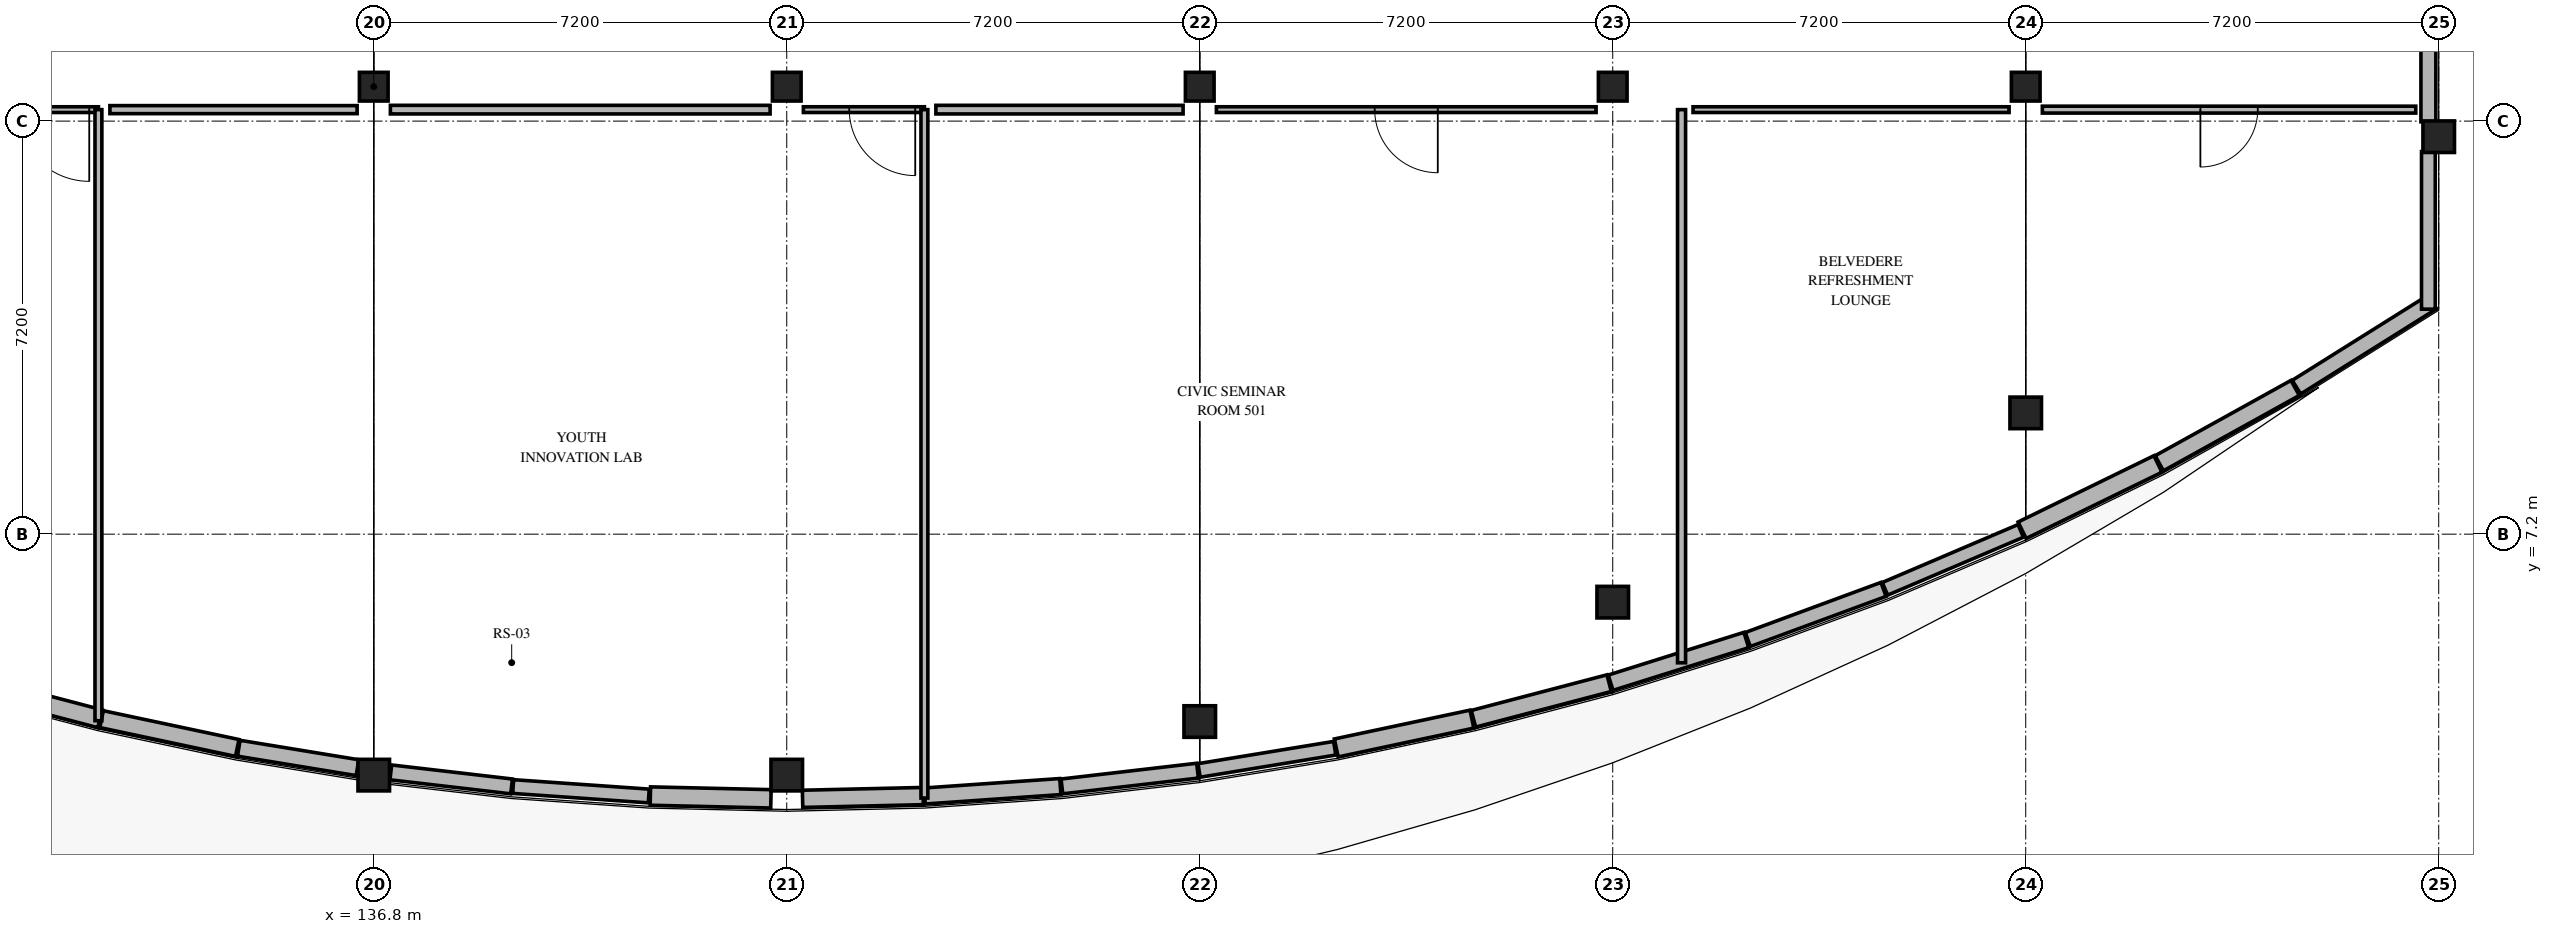
"""IFC4 building model, lengths in metres.
Left out: names, types, materials, properties, quantities, classifications, styles, units other than length and angle.
Written with IfcOpenShell. Run it as: python <this file> out.ifc"""

import sys

from ifc_helpers import new_model, si_unit, direction, frame, frame_2d, origin, origin_2d, place, context, subcontext, project, spatial, rectangle, extrude, element, fill, save


model = new_model("IFC4")
c1 = context("Model", 3, precision=1e-05, world=origin(), true_north=direction((0.0, 1.0)))
c2 = subcontext(c1, "Body", "Model", "MODEL_VIEW")
j1 = project(units=[si_unit("LENGTHUNIT", "METRE"), si_unit("PLANEANGLEUNIT", "RADIAN")], contexts=[c1])
p1 = place(None, origin())
s1 = spatial("IfcSite", under=j1, at=p1, CompositionType="ELEMENT")
p2 = place(p1, origin())
s2 = spatial("IfcBuilding", under=s1, at=p2, CompositionType="ELEMENT")
p3 = place(p2, frame((0.0, 0.0, 20.7)))
s3 = spatial("IfcBuildingStorey", under=s2, at=p3, CompositionType="ELEMENT", Elevation=20.7)
p4 = place(p3, frame((136.8, 3.0, 0.0), z_axis=(0.0, 0.0, 1.0), x_axis=(1.0, 0.0, 0.0)))
e1 = element("IfcColumn", 1, at=p4, inside=s3, PredefinedType="COLUMN", context=c2, shape_type="SweptSolid", body=[
    extrude(rectangle(XDim=0.55, YDim=0.55, at=origin_2d()), origin(), (0.0, 0.0, 1.0), 3.9),
])
p5 = place(p3, frame((136.8, 15.0, 0.0), z_axis=(0.0, 0.0, 1.0), x_axis=(1.0, 0.0, 0.0)))
e2 = element("IfcColumn", 2, at=p5, inside=s3, PredefinedType="COLUMN", context=c2, shape_type="SweptSolid", body=[
    extrude(rectangle(XDim=0.5, YDim=0.5, at=origin_2d()), origin(), (0.0, 0.0, 1.0), 3.9),
])
p6 = place(p3, frame((144.0, 3.0, 0.0), z_axis=(0.0, 0.0, 1.0), x_axis=(1.0, 0.0, 0.0)))
e3 = element("IfcColumn", 3, at=p6, inside=s3, PredefinedType="COLUMN", context=c2, shape_type="SweptSolid", body=[
    extrude(rectangle(XDim=0.55, YDim=0.55, at=origin_2d()), origin(), (0.0, 0.0, 1.0), 3.9),
])
p7 = place(p3, frame((144.0, 15.0, 0.0), z_axis=(0.0, 0.0, 1.0), x_axis=(1.0, 0.0, 0.0)))
e4 = element("IfcColumn", 4, at=p7, inside=s3, PredefinedType="COLUMN", context=c2, shape_type="SweptSolid", body=[
    extrude(rectangle(XDim=0.5, YDim=0.5, at=origin_2d()), origin(), (0.0, 0.0, 1.0), 3.9),
])
p8 = place(p3, frame((151.2, 3.934, 0.0), z_axis=(0.0, 0.0, 1.0), x_axis=(1.0, 0.0, 0.0)))
e5 = element("IfcColumn", 5, at=p8, inside=s3, PredefinedType="COLUMN", context=c2, shape_type="SweptSolid", body=[
    extrude(rectangle(XDim=0.55, YDim=0.55, at=origin_2d()), origin(), (0.0, 0.0, 1.0), 3.9),
])
p9 = place(p3, frame((151.2, 15.0, 0.0), z_axis=(0.0, 0.0, 1.0), x_axis=(1.0, 0.0, 0.0)))
e6 = element("IfcColumn", 6, at=p9, inside=s3, PredefinedType="COLUMN", context=c2, shape_type="SweptSolid", body=[
    extrude(rectangle(XDim=0.5, YDim=0.5, at=origin_2d()), origin(), (0.0, 0.0, 1.0), 3.9),
])
p10 = place(p3, frame((158.4, 6.015, 0.0), z_axis=(0.0, 0.0, 1.0), x_axis=(1.0, 0.0, 0.0)))
e7 = element("IfcColumn", 7, at=p10, inside=s3, PredefinedType="COLUMN", context=c2, shape_type="SweptSolid", body=[
    extrude(rectangle(XDim=0.55, YDim=0.55, at=origin_2d()), origin(), (0.0, 0.0, 1.0), 3.9),
])
p11 = place(p3, frame((158.4, 15.0, 0.0), z_axis=(0.0, 0.0, 1.0), x_axis=(1.0, 0.0, 0.0)))
e8 = element("IfcColumn", 8, at=p11, inside=s3, PredefinedType="COLUMN", context=c2, shape_type="SweptSolid", body=[
    extrude(rectangle(XDim=0.5, YDim=0.5, at=origin_2d()), origin(), (0.0, 0.0, 1.0), 3.9),
])
p12 = place(p3, frame((165.6, 9.314, 0.0), z_axis=(0.0, 0.0, 1.0), x_axis=(1.0, 0.0, 0.0)))
e9 = element("IfcColumn", 9, at=p12, inside=s3, PredefinedType="COLUMN", context=c2, shape_type="SweptSolid", body=[
    extrude(rectangle(XDim=0.55, YDim=0.55, at=origin_2d()), origin(), (0.0, 0.0, 1.0), 3.9),
])
p13 = place(p3, frame((165.6, 15.0, 0.0), z_axis=(0.0, 0.0, 1.0), x_axis=(1.0, 0.0, 0.0)))
e10 = element("IfcColumn", 10, at=p13, inside=s3, PredefinedType="COLUMN", context=c2, shape_type="SweptSolid", body=[
    extrude(rectangle(XDim=0.5, YDim=0.5, at=origin_2d()), origin(), (0.0, 0.0, 1.0), 3.9),
])
p14 = place(p3, frame((172.8, 14.128, 0.0), z_axis=(0.0, 0.0, 1.0), x_axis=(1.0, 0.0, 0.0)))
e11 = element("IfcColumn", 11, at=p14, inside=s3, PredefinedType="COLUMN", context=c2, shape_type="SweptSolid", body=[
    extrude(rectangle(XDim=0.55, YDim=0.55, at=origin_2d()), origin(), (0.0, 0.0, 1.0), 3.9),
])
p15 = place(p3, frame((132.028, 3.982, 0.0), z_axis=(0.0, 0.0, 1.0), x_axis=(-0.967257930518, 0.253795381852, 0.0)))
e12 = element("IfcWall", 12, at=p15, inside=s3, PredefinedType="SOLIDWALL", context=c2, shape_type="SweptSolid", body=[
    extrude(rectangle(XDim=2.445, YDim=0.32, at=frame_2d((1.223, 0.0))), origin(), (0.0, 0.0, 1.0), 3.01),
])
p16 = place(p3, frame((134.42, 3.474, 0.0), z_axis=(0.0, 0.0, 1.0), x_axis=(-0.978189380311, 0.207715036162, 0.0)))
e13 = element("IfcWall", 13, at=p16, inside=s3, PredefinedType="SOLIDWALL", context=c2, shape_type="SweptSolid", body=[
    extrude(rectangle(XDim=2.418, YDim=0.3, at=frame_2d((1.209, 0.0))), origin(), (0.0, 0.0, 1.0), 3.06),
])
p17 = place(p3, frame((136.516, 3.13, 0.0), z_axis=(0.0, 0.0, 1.0), x_axis=(-0.986855683542, 0.161604021798, 0.0)))
e14 = element("IfcWall", 14, at=p17, inside=s3, PredefinedType="SOLIDWALL", context=c2, shape_type="SweptSolid", body=[
    extrude(rectangle(XDim=2.097, YDim=0.28, at=frame_2d((1.048, 0.0))), origin(), (0.0, 0.0, 1.0), 3.06),
])
p18 = place(p3, frame((139.203, 2.803, 0.0), z_axis=(0.0, 0.0, 1.0), x_axis=(-0.993317824854, 0.115410999595, 0.0)))
e15 = element("IfcWall", 15, at=p18, inside=s3, PredefinedType="SOLIDWALL", context=c2, shape_type="SweptSolid", body=[
    extrude(rectangle(XDim=2.12, YDim=0.26, at=frame_2d((1.06, 0.0))), origin(), (0.0, 0.0, 1.0), 3.06),
])
p19 = place(p3, frame((141.594, 2.636, 0.0), z_axis=(0.0, 0.0, 1.0), x_axis=(-0.997600485651, 0.069233453099, 0.0)))
e16 = element("IfcWall", 16, at=p19, inside=s3, PredefinedType="SOLIDWALL", context=c2, shape_type="SweptSolid", body=[
    extrude(rectangle(XDim=2.37, YDim=0.24, at=frame_2d((1.185, 0.0))), origin(), (0.0, 0.0, 1.0), 3.06),
])
p20 = place(p3, frame((143.724, 2.586, 0.0), z_axis=(0.0, 0.0, 1.0), x_axis=(-0.99973294744, 0.023109171395, 0.0)))
e17 = element("IfcWall", 17, at=p20, inside=s3, PredefinedType="SOLIDWALL", context=c2, shape_type="SweptSolid", body=[
    extrude(rectangle(XDim=2.102, YDim=0.32, at=frame_2d((1.051, 0.0))), origin(), (0.0, 0.0, 1.0), 3.66),
])
p21 = place(p3, frame((146.378, 2.635, 0.0), z_axis=(0.0, 0.0, 1.0), x_axis=(-0.99973294744, -0.023109171395, 0.0)))
e18 = element("IfcWall", 18, at=p21, inside=s3, PredefinedType="SOLIDWALL", context=c2, shape_type="SweptSolid", body=[
    extrude(rectangle(XDim=2.102, YDim=0.3, at=frame_2d((1.051, 0.0))), origin(), (0.0, 0.0, 1.0), 3.06),
])
p22 = place(p3, frame((148.77, 2.8, 0.0), z_axis=(0.0, 0.0, 1.0), x_axis=(-0.997600485651, -0.069233453099, 0.0)))
e19 = element("IfcWall", 19, at=p22, inside=s3, PredefinedType="SOLIDWALL", context=c2, shape_type="SweptSolid", body=[
    extrude(rectangle(XDim=2.37, YDim=0.28, at=frame_2d((1.185, 0.0))), origin(), (0.0, 0.0, 1.0), 3.06),
])
p23 = place(p3, frame((151.161, 3.078, 0.0), z_axis=(0.0, 0.0, 1.0), x_axis=(-0.993319690017, -0.115394945402, 0.0)))
e20 = element("IfcWall", 20, at=p23, inside=s3, PredefinedType="SOLIDWALL", context=c2, shape_type="SweptSolid", body=[
    extrude(rectangle(XDim=2.38, YDim=0.26, at=frame_2d((1.19, 0.0))), origin(), (0.0, 0.0, 1.0), 3.06),
])
p24 = place(p3, frame((153.553, 3.469, 0.0), z_axis=(0.0, 0.0, 1.0), x_axis=(-0.986852722913, -0.161622100221, 0.0)))
e21 = element("IfcWall", 21, at=p24, inside=s3, PredefinedType="SOLIDWALL", context=c2, shape_type="SweptSolid", body=[
    extrude(rectangle(XDim=2.396, YDim=0.24, at=frame_2d((1.198, 0.0))), origin(), (0.0, 0.0, 1.0), 3.06),
])
p25 = place(p3, frame((155.945, 3.976, 0.0), z_axis=(0.0, 0.0, 1.0), x_axis=(-0.978189380311, -0.207715036162, 0.0)))
e22 = element("IfcWall", 22, at=p25, inside=s3, PredefinedType="SOLIDWALL", context=c2, shape_type="SweptSolid", body=[
    extrude(rectangle(XDim=2.418, YDim=0.32, at=frame_2d((1.209, 0.0))), origin(), (0.0, 0.0, 1.0), 3.06),
])
p26 = place(p3, frame((158.337, 4.603, 0.0), z_axis=(0.0, 0.0, 1.0), x_axis=(-0.967257930518, -0.253795381852, 0.0)))
e23 = element("IfcWall", 23, at=p26, inside=s3, PredefinedType="SOLIDWALL", context=c2, shape_type="SweptSolid", body=[
    extrude(rectangle(XDim=2.445, YDim=0.3, at=frame_2d((1.223, 0.0))), origin(), (0.0, 0.0, 1.0), 3.06),
])
p27 = place(p3, frame((160.729, 5.355, 0.0), z_axis=(0.0, 0.0, 1.0), x_axis=(-0.953884231724, -0.30017473656, 0.0)))
e24 = element("IfcWall", 24, at=p27, inside=s3, PredefinedType="SOLIDWALL", context=c2, shape_type="SweptSolid", body=[
    extrude(rectangle(XDim=2.48, YDim=0.28, at=frame_2d((1.24, 0.0))), origin(), (0.0, 0.0, 1.0), 3.06),
])
p28 = place(p3, frame((163.121, 6.237, 0.0), z_axis=(0.0, 0.0, 1.0), x_axis=(-0.938146303957, -0.346239097117, 0.0)))
e25 = element("IfcWall", 25, at=p28, inside=s3, PredefinedType="SOLIDWALL", context=c2, shape_type="SweptSolid", body=[
    extrude(rectangle(XDim=2.522, YDim=0.26, at=frame_2d((1.261, 0.0))), origin(), (0.0, 0.0, 1.0), 3.06),
])
p29 = place(p3, frame((165.513, 7.257, 0.0), z_axis=(0.0, 0.0, 1.0), x_axis=(-0.919781821174, -0.392430123001, 0.0)))
e26 = element("IfcWall", 26, at=p29, inside=s3, PredefinedType="SOLIDWALL", context=c2, shape_type="SweptSolid", body=[
    extrude(rectangle(XDim=2.573, YDim=0.24, at=frame_2d((1.287, 0.0))), origin(), (0.0, 0.0, 1.0), 3.06),
])
p30 = place(p3, frame((167.905, 8.424, 0.0), z_axis=(0.0, 0.0, 1.0), x_axis=(-0.898667775588, -0.438629945535, 0.0)))
e27 = element("IfcWall", 27, at=p30, inside=s3, PredefinedType="SOLIDWALL", context=c2, shape_type="SweptSolid", body=[
    extrude(rectangle(XDim=2.634, YDim=0.32, at=frame_2d((1.317, 0.0))), origin(), (0.0, 0.0, 1.0), 3.06),
])
p31 = place(p3, frame((170.297, 9.749, 0.0), z_axis=(0.0, 0.0, 1.0), x_axis=(-0.874616129919, -0.484816073666, 0.0)))
e28 = element("IfcWall", 28, at=p31, inside=s3, PredefinedType="SOLIDWALL", context=c2, shape_type="SweptSolid", body=[
    extrude(rectangle(XDim=2.708, YDim=0.3, at=frame_2d((1.354, 0.0))), origin(), (0.0, 0.0, 1.0), 3.06),
])
p32 = place(p3, frame((172.689, 11.247, 0.0), z_axis=(0.0, 0.0, 1.0), x_axis=(-0.847458290903, -0.530861983174, 0.0)))
e29 = element("IfcWall", 29, at=p32, inside=s3, PredefinedType="SOLIDWALL", context=c2, shape_type="SweptSolid", body=[
    extrude(rectangle(XDim=2.796, YDim=0.28, at=frame_2d((1.398, 0.0))), origin(), (0.0, 0.0, 1.0), 3.06),
])
p33 = place(p3, frame((172.62, 22.165, 0.0), z_axis=(0.0, 0.0, 1.0), x_axis=(0.0, -1.0, 0.0)))
e30 = element("IfcWall", 30, at=p33, inside=s3, PredefinedType="SOLIDWALL", context=c2, shape_type="SweptSolid", body=[
    extrude(rectangle(XDim=7.777, YDim=0.26, at=frame_2d((3.889, 0.0))), origin(), (0.0, 0.0, 1.0), 2.9),
])
p34 = place(p33, frame((2.989, 0.0, 0.9)))
e31 = element("IfcOpeningElement", 31, at=p34, cuts=e30, PredefinedType="OPENING", context=c2, shape_type="SweptSolid", body=[
    extrude(rectangle(XDim=1.8, YDim=0.75, at=frame_2d((0.9, 0.375))), frame((0.0, 0.14, 0.0), z_axis=(0.0, -1.0, 0.0), x_axis=(1.0, 0.0, 0.0)), (0.0, 0.0, 1.0), 0.28),
])
p35 = place(p3, frame((172.62, 13.868, 0.0), z_axis=(0.0, 0.0, 1.0), x_axis=(0.0, -1.0, 0.0)))
e32 = element("IfcWall", 32, at=p35, inside=s3, PredefinedType="SOLIDWALL", context=c2, shape_type="SweptSolid", body=[
    extrude(rectangle(XDim=2.746, YDim=0.24, at=frame_2d((1.373, 0.0))), origin(), (0.0, 0.0, 1.0), 3.06),
])
p36 = place(p3, frame((132.0, 14.6, 0.0), z_axis=(0.0, 0.0, 1.0), x_axis=(-1.0, 0.0, 0.0)))
e33 = element("IfcWall", 33, at=p36, inside=s3, PredefinedType="PARTITIONING", context=c2, shape_type="SweptSolid", body=[
    extrude(rectangle(XDim=2.11, YDim=0.1, at=frame_2d((1.055, 0.0))), origin(), (0.0, 0.0, 1.0), 3.66),
])
p37 = place(p36, frame((0.16, 0.0, 0.0)))
e34 = element("IfcOpeningElement", 34, at=p37, cuts=e33, PredefinedType="OPENING", context=c2, shape_type="SweptSolid", body=[
    extrude(rectangle(XDim=1.25, YDim=2.2, at=frame_2d((0.625, 1.1))), frame((0.0, 0.06, 0.0), z_axis=(0.0, -1.0, 0.0), x_axis=(1.0, 0.0, 0.0)), (0.0, 0.0, 1.0), 0.12),
])
p38 = place(p3, frame((132.0, 3.948, 0.0), z_axis=(0.0, 0.0, 1.0), x_axis=(0.0, 1.0, 0.0)))
e35 = element("IfcWall", 35, at=p38, inside=s3, PredefinedType="PARTITIONING", context=c2, shape_type="SweptSolid", body=[
    extrude(rectangle(XDim=10.652, YDim=0.12, at=frame_2d((5.326, 0.0))), origin(), (0.0, 0.0, 1.0), 3.06),
])
p39 = place(p3, frame((146.4, 14.6, 0.0), z_axis=(0.0, 0.0, 1.0), x_axis=(-1.0, 0.0, 0.0)))
e36 = element("IfcWall", 36, at=p39, inside=s3, PredefinedType="PARTITIONING", context=c2, shape_type="SweptSolid", body=[
    extrude(rectangle(XDim=2.11, YDim=0.1, at=frame_2d((1.055, 0.0))), origin(), (0.0, 0.0, 1.0), 3.66),
])
p40 = place(p39, frame((0.16, 0.0, 0.0)))
e37 = element("IfcOpeningElement", 37, at=p40, cuts=e36, PredefinedType="OPENING", context=c2, shape_type="SweptSolid", body=[
    extrude(rectangle(XDim=1.15, YDim=2.15, at=frame_2d((0.575, 1.075))), frame((0.0, 0.06, 0.0), z_axis=(0.0, -1.0, 0.0), x_axis=(1.0, 0.0, 0.0)), (0.0, 0.0, 1.0), 0.12),
])
p41 = place(p3, frame((143.71, 14.6, 0.0), z_axis=(0.0, 0.0, 1.0), x_axis=(-1.0, 0.0, 0.0)))
e38 = element("IfcWall", 38, at=p41, inside=s3, PredefinedType="PARTITIONING", context=c2, shape_type="SweptSolid", body=[
    extrude(rectangle(XDim=6.62, YDim=0.15, at=frame_2d((3.31, 0.0))), origin(), (0.0, 0.0, 1.0), 3.66),
])
p42 = place(p3, frame((136.51, 14.6, 0.0), z_axis=(0.0, 0.0, 1.0), x_axis=(-1.0, 0.0, 0.0)))
e39 = element("IfcWall", 39, at=p42, inside=s3, PredefinedType="PARTITIONING", context=c2, shape_type="SweptSolid", body=[
    extrude(rectangle(XDim=4.31, YDim=0.14, at=frame_2d((2.155, 0.0))), origin(), (0.0, 0.0, 1.0), 3.66),
])
p43 = place(p3, frame((146.4, 2.6, 0.0), z_axis=(0.0, 0.0, 1.0), x_axis=(0.0, 1.0, 0.0)))
e40 = element("IfcWall", 40, at=p43, inside=s3, PredefinedType="PARTITIONING", context=c2, shape_type="SweptSolid", body=[
    extrude(rectangle(XDim=12.0, YDim=0.12, at=frame_2d((6.0, 0.0))), origin(), (0.0, 0.0, 1.0), 3.06),
])
p44 = place(p3, frame((158.11, 14.6, 0.0), z_axis=(0.0, 0.0, 1.0), x_axis=(-1.0, 0.0, 0.0)))
e41 = element("IfcWall", 41, at=p44, inside=s3, PredefinedType="PARTITIONING", context=c2, shape_type="SweptSolid", body=[
    extrude(rectangle(XDim=6.62, YDim=0.1, at=frame_2d((3.31, 0.0))), origin(), (0.0, 0.0, 1.0), 3.66),
])
p45 = place(p44, frame((2.76, 0.0, 0.0)))
e42 = element("IfcOpeningElement", 42, at=p45, cuts=e41, PredefinedType="OPENING", context=c2, shape_type="SweptSolid", body=[
    extrude(rectangle(XDim=1.1, YDim=2.15, at=frame_2d((0.55, 1.075))), frame((0.0, 0.06, 0.0), z_axis=(0.0, -1.0, 0.0), x_axis=(1.0, 0.0, 0.0)), (0.0, 0.0, 1.0), 0.12),
])
p46 = place(p3, frame((150.91, 14.6, 0.0), z_axis=(0.0, 0.0, 1.0), x_axis=(-1.0, 0.0, 0.0)))
e43 = element("IfcWall", 43, at=p46, inside=s3, PredefinedType="PARTITIONING", context=c2, shape_type="SweptSolid", body=[
    extrude(rectangle(XDim=4.31, YDim=0.15, at=frame_2d((2.155, 0.0))), origin(), (0.0, 0.0, 1.0), 3.66),
])
p47 = place(p3, frame((159.6, 4.958, 0.0), z_axis=(0.0, 0.0, 1.0), x_axis=(0.0, 1.0, 0.0)))
e44 = element("IfcWall", 44, at=p47, inside=s3, PredefinedType="PARTITIONING", context=c2, shape_type="SweptSolid", body=[
    extrude(rectangle(XDim=9.642, YDim=0.14, at=frame_2d((4.821, 0.0))), origin(), (0.0, 0.0, 1.0), 2.98),
])
p48 = place(p3, frame((172.4, 14.6, 0.0), z_axis=(0.0, 0.0, 1.0), x_axis=(-1.0, 0.0, 0.0)))
e45 = element("IfcWall", 45, at=p48, inside=s3, PredefinedType="PARTITIONING", context=c2, shape_type="SweptSolid", body=[
    extrude(rectangle(XDim=6.51, YDim=0.12, at=frame_2d((3.255, 0.0))), origin(), (0.0, 0.0, 1.0), 3.66),
])
p49 = place(p48, frame((2.755, 0.0, 0.0)))
e46 = element("IfcOpeningElement", 46, at=p49, cuts=e45, PredefinedType="OPENING", context=c2, shape_type="SweptSolid", body=[
    extrude(rectangle(XDim=1.0, YDim=2.15, at=frame_2d((0.5, 1.075))), frame((0.0, 0.07, 0.0), z_axis=(0.0, -1.0, 0.0), x_axis=(1.0, 0.0, 0.0)), (0.0, 0.0, 1.0), 0.14),
])
p50 = place(p3, frame((165.31, 14.6, 0.0), z_axis=(0.0, 0.0, 1.0), x_axis=(-1.0, 0.0, 0.0)))
e47 = element("IfcWall", 47, at=p50, inside=s3, PredefinedType="PARTITIONING", context=c2, shape_type="SweptSolid", body=[
    extrude(rectangle(XDim=5.51, YDim=0.1, at=frame_2d((2.755, 0.0))), origin(), (0.0, 0.0, 1.0), 3.66),
])
p51 = place(p37, origin())
e48 = element("IfcDoor", 48, at=p51, inside=s3, OperationType="SINGLE_SWING_LEFT", PredefinedType="DOOR", context=c2, shape_type="SweptSolid", body=[
    extrude(rectangle(XDim=1.25, YDim=2.2, at=frame_2d((0.625, 1.1))), frame((0.0, 0.025, 0.0), z_axis=(0.0, -1.0, 0.0), x_axis=(1.0, 0.0, 0.0)), (0.0, 0.0, 1.0), 0.05),
])
fill(e34, e48)
p52 = place(p40, origin())
e49 = element("IfcDoor", 49, at=p52, inside=s3, OperationType="SINGLE_SWING_LEFT", PredefinedType="DOOR", context=c2, shape_type="SweptSolid", body=[
    extrude(rectangle(XDim=1.15, YDim=2.15, at=frame_2d((0.575, 1.075))), frame((0.0, 0.025, 0.0), z_axis=(0.0, -1.0, 0.0), x_axis=(1.0, 0.0, 0.0)), (0.0, 0.0, 1.0), 0.05),
])
fill(e37, e49)
p53 = place(p45, origin())
e50 = element("IfcDoor", 50, at=p53, inside=s3, OperationType="SINGLE_SWING_LEFT", PredefinedType="DOOR", context=c2, shape_type="SweptSolid", body=[
    extrude(rectangle(XDim=1.1, YDim=2.15, at=frame_2d((0.55, 1.075))), frame((0.0, 0.025, 0.0), z_axis=(0.0, -1.0, 0.0), x_axis=(1.0, 0.0, 0.0)), (0.0, 0.0, 1.0), 0.05),
])
fill(e42, e50)
p54 = place(p49, origin())
e51 = element("IfcDoor", 51, at=p54, inside=s3, OperationType="SINGLE_SWING_RIGHT", PredefinedType="DOOR", context=c2, shape_type="SweptSolid", body=[
    extrude(rectangle(XDim=1.0, YDim=2.15, at=frame_2d((0.5, 1.075))), frame((0.0, 0.025, 0.0), z_axis=(0.0, -1.0, 0.0), x_axis=(1.0, 0.0, 0.0)), (0.0, 0.0, 1.0), 0.05),
])
fill(e46, e51)
save(model, sys.argv[1])
